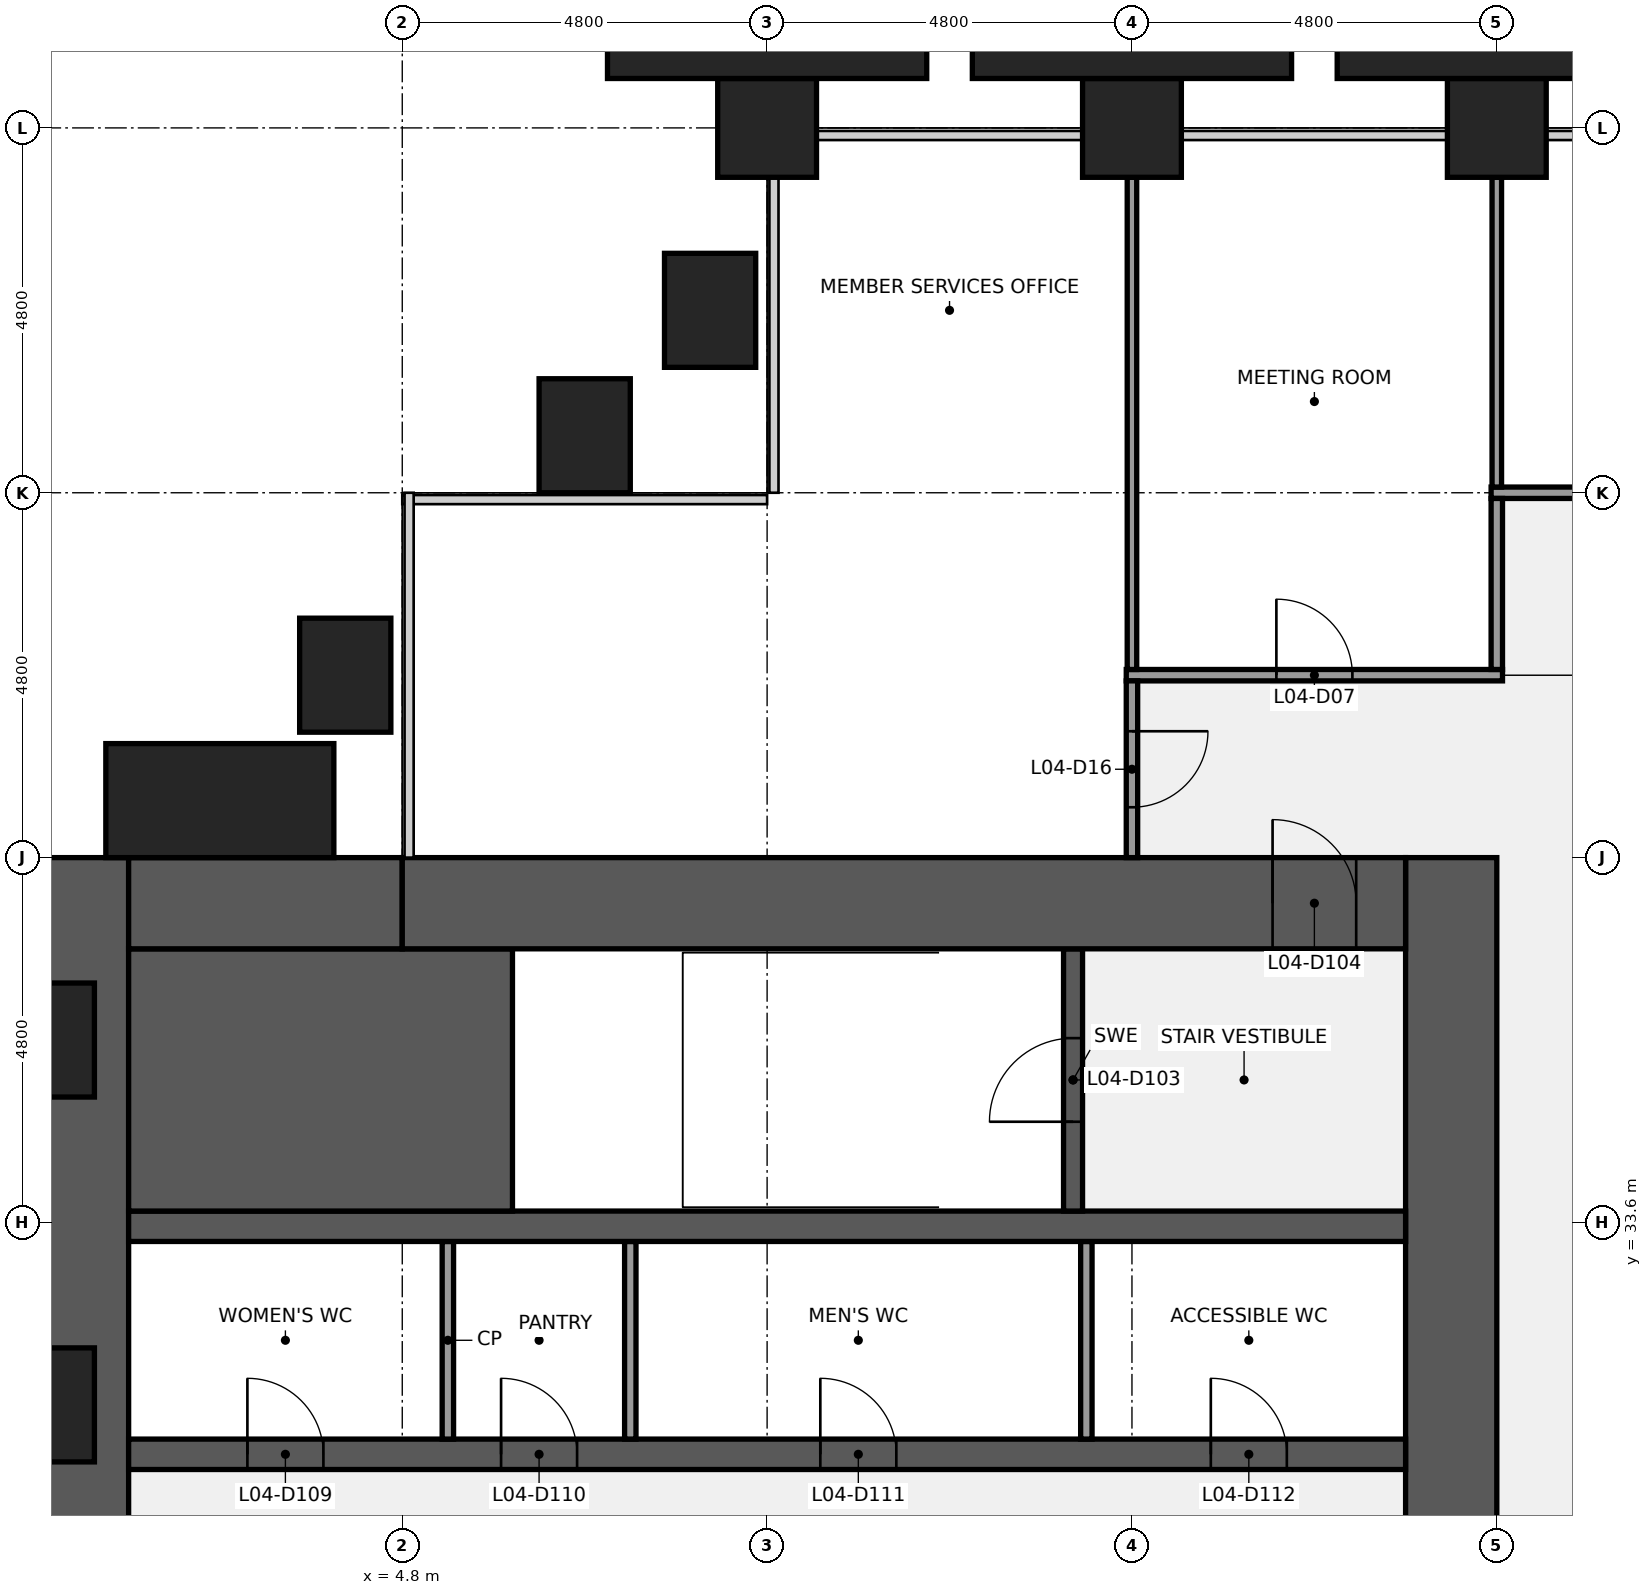
"""IFC4 building model, lengths in metres.
Left out: names, types, materials, properties, quantities, classifications, styles, units other than length and angle.
Written with IfcOpenShell. Run it as: python <this file> out.ifc"""

import sys

from ifc_helpers import new_model, si_unit, direction, frame, frame_2d, origin, origin_2d, place, context, subcontext, project, spatial, rectangle, extrude, element, fill, save


model = new_model("IFC4")
c1 = context("Model", 3, precision=1e-05, world=origin(), true_north=direction((0.0, 1.0)))
c2 = subcontext(c1, "Body", "Model", "MODEL_VIEW")
j1 = project(units=[si_unit("LENGTHUNIT", "METRE"), si_unit("PLANEANGLEUNIT", "RADIAN")], contexts=[c1])
p1 = place(None, origin())
s1 = spatial("IfcSite", under=j1, at=p1, CompositionType="ELEMENT")
p2 = place(p1, origin())
s2 = spatial("IfcBuilding", under=s1, at=p2, CompositionType="ELEMENT")
p3 = place(p2, frame((0.0, 0.0, 25.8)))
s3 = spatial("IfcBuildingStorey", under=s2, at=p3, CompositionType="ELEMENT", Elevation=25.8)
for number, where, z_axis, x_axis in (
    (1, (9.6, 48.0, 0.0), (0.0, 0.0, 1.0), (1.0, 0.0, 0.0)),
    (2, (14.4, 48.0, 0.0), (0.0, 0.0, 1.0), (1.0, 0.0, 0.0)),
    (3, (19.2, 48.0, 0.0), (0.0, 0.0, 1.0), (1.0, 0.0, 0.0)),
):
    element("IfcColumn", number, at=place(p3, frame(where, z_axis=z_axis, x_axis=x_axis)), inside=s3, PredefinedType="COLUMN", context=c2, shape_type="SweptSolid", body=[
        extrude(rectangle(XDim=1.3, YDim=1.3, at=origin_2d()), origin(), (0.0, 0.0, 1.0), 4.4),
    ])
p4 = place(p3, frame((0.6, 9.6, 0.0), z_axis=(0.0, 0.0, 1.0), x_axis=(0.0, 1.0, 0.0)))
e4 = element("IfcWall", 4, at=p4, inside=s3, PredefinedType="SHEAR", context=c2, shape_type="SweptSolid", body=[
    extrude(rectangle(XDim=28.8, YDim=1.2, at=frame_2d((14.4, 0.0))), origin(), (0.0, 0.0, 1.0), 4.24),
])
p5 = place(p4, frame((8.85, 0.0, 0.9)))
e5 = element("IfcOpeningElement", 5, at=p5, cuts=e4, PredefinedType="OPENING", context=c2, shape_type="SweptSolid", body=[
    extrude(rectangle(XDim=1.5, YDim=1.5, at=frame_2d((0.75, 0.75))), frame((0.0, 0.61, 0.0), z_axis=(0.0, -1.0, 0.0), x_axis=(1.0, 0.0, 0.0)), (0.0, 0.0, 1.0), 1.22),
])
p6 = place(p4, frame((18.45, 0.0, 0.9)))
e6 = element("IfcOpeningElement", 6, at=p6, cuts=e4, PredefinedType="OPENING", context=c2, shape_type="SweptSolid", body=[
    extrude(rectangle(XDim=1.5, YDim=1.5, at=frame_2d((0.75, 0.75))), frame((0.0, 0.61, 0.0), z_axis=(0.0, -1.0, 0.0), x_axis=(1.0, 0.0, 0.0)), (0.0, 0.0, 1.0), 1.22),
])
p7 = place(p3, frame((18.6, 38.4, 0.0), z_axis=(0.0, 0.0, 1.0), x_axis=(0.0, -1.0, 0.0)))
e7 = element("IfcWall", 7, at=p7, inside=s3, PredefinedType="SHEAR", context=c2, shape_type="SweptSolid", body=[
    extrude(rectangle(XDim=28.8, YDim=1.2, at=frame_2d((14.4, 0.0))), origin(), (0.0, 0.0, 1.0), 4.24),
])
p8 = place(p7, frame((18.3, 0.0, 0.0)))
e8 = element("IfcOpeningElement", 8, at=p8, cuts=e7, PredefinedType="OPENING", context=c2, shape_type="SweptSolid", body=[
    extrude(rectangle(XDim=1.8, YDim=2.1, at=frame_2d((0.9, 1.05))), frame((0.0, 0.61, 0.0), z_axis=(0.0, -1.0, 0.0), x_axis=(1.0, 0.0, 0.0)), (0.0, 0.0, 1.0), 1.22),
])
p9 = place(p7, frame((8.7, 0.0, 0.0)))
e9 = element("IfcOpeningElement", 9, at=p9, cuts=e7, PredefinedType="OPENING", context=c2, shape_type="SweptSolid", body=[
    extrude(rectangle(XDim=1.8, YDim=2.1, at=frame_2d((0.9, 1.05))), frame((0.0, 0.61, 0.0), z_axis=(0.0, -1.0, 0.0), x_axis=(1.0, 0.0, 0.0)), (0.0, 0.0, 1.0), 1.22),
])
p10 = place(p3, frame((1.2, 30.55, 0.0), z_axis=(0.0, 0.0, 1.0), x_axis=(1.0, 0.0, 0.0)))
e10 = element("IfcWall", 10, at=p10, inside=s3, PredefinedType="SHEAR", context=c2, shape_type="SweptSolid", body=[
    extrude(rectangle(XDim=16.8, YDim=0.4, at=frame_2d((8.4, 0.0))), origin(), (0.0, 0.0, 1.0), 4.24),
])
p11 = place(p10, frame((1.562, 0.0, 0.0)))
e11 = element("IfcOpeningElement", 11, at=p11, cuts=e10, PredefinedType="OPENING", context=c2, shape_type="SweptSolid", body=[
    extrude(rectangle(XDim=1.0, YDim=2.1, at=frame_2d((0.5, 1.05))), frame((0.0, 0.21, 0.0), z_axis=(0.0, -1.0, 0.0), x_axis=(1.0, 0.0, 0.0)), (0.0, 0.0, 1.0), 0.42),
])
p12 = place(p10, frame((4.9, 0.0, 0.0)))
e12 = element("IfcOpeningElement", 12, at=p12, cuts=e10, PredefinedType="OPENING", context=c2, shape_type="SweptSolid", body=[
    extrude(rectangle(XDim=1.0, YDim=2.1, at=frame_2d((0.5, 1.05))), frame((0.0, 0.21, 0.0), z_axis=(0.0, -1.0, 0.0), x_axis=(1.0, 0.0, 0.0)), (0.0, 0.0, 1.0), 0.42),
])
p13 = place(p10, frame((9.1, 0.0, 0.0)))
e13 = element("IfcOpeningElement", 13, at=p13, cuts=e10, PredefinedType="OPENING", context=c2, shape_type="SweptSolid", body=[
    extrude(rectangle(XDim=1.0, YDim=2.1, at=frame_2d((0.5, 1.05))), frame((0.0, 0.21, 0.0), z_axis=(0.0, -1.0, 0.0), x_axis=(1.0, 0.0, 0.0)), (0.0, 0.0, 1.0), 0.42),
])
p14 = place(p10, frame((14.238, 0.0, 0.0)))
e14 = element("IfcOpeningElement", 14, at=p14, cuts=e10, PredefinedType="OPENING", context=c2, shape_type="SweptSolid", body=[
    extrude(rectangle(XDim=1.0, YDim=2.1, at=frame_2d((0.5, 1.05))), frame((0.0, 0.21, 0.0), z_axis=(0.0, -1.0, 0.0), x_axis=(1.0, 0.0, 0.0)), (0.0, 0.0, 1.0), 0.42),
])
for number, where, z_axis, x_axis in (
    (15, (5.4, 30.75, 0.0), (0.0, 0.0, 1.0), (0.0, 1.0, 0.0)),
    (16, (7.8, 30.75, 0.0), (0.0, 0.0, 1.0), (0.0, 1.0, 0.0)),
    (17, (13.8, 30.75, 0.0), (0.0, 0.0, 1.0), (0.0, 1.0, 0.0)),
):
    element("IfcWall", number, at=place(p3, frame(where, z_axis=z_axis, x_axis=x_axis)), inside=s3, PredefinedType="PARTITIONING", context=c2, shape_type="SweptSolid", body=[
        extrude(rectangle(XDim=2.6, YDim=0.15, at=frame_2d((1.3, 0.0))), origin(), (0.0, 0.0, 1.0), 4.24),
    ])
p15 = place(p3, frame((1.2, 33.55, 0.0), z_axis=(0.0, 0.0, 1.0), x_axis=(1.0, 0.0, 0.0)))
e18 = element("IfcWall", 18, at=p15, inside=s3, PredefinedType="SHEAR", context=c2, shape_type="SweptSolid", body=[
    extrude(rectangle(XDim=16.8, YDim=0.4, at=frame_2d((8.4, 0.0))), origin(), (0.0, 0.0, 1.0), 4.24),
])
p16 = place(p3, frame((1.2, 35.475, 0.0), z_axis=(0.0, 0.0, 1.0), x_axis=(1.0, 0.0, 0.0)))
e19 = element("IfcWall", 19, at=p16, inside=s3, PredefinedType="SHEAR", context=c2, shape_type="SweptSolid", body=[
    extrude(rectangle(XDim=5.05, YDim=3.45, at=frame_2d((2.525, 0.0))), origin(), (0.0, 0.0, 1.0), 4.24),
])
p17 = place(p3, frame((13.625, 33.75, 0.0), z_axis=(0.0, 0.0, 1.0), x_axis=(0.0, 1.0, 0.0)))
e20 = element("IfcWall", 20, at=p17, inside=s3, PredefinedType="SHEAR", context=c2, shape_type="SweptSolid", body=[
    extrude(rectangle(XDim=3.45, YDim=0.25, at=frame_2d((1.725, 0.0))), origin(), (0.0, 0.0, 1.0), 4.24),
])
p18 = place(p17, frame((1.175, 0.0, 0.0)))
e21 = element("IfcOpeningElement", 21, at=p18, cuts=e20, PredefinedType="OPENING", context=c2, shape_type="SweptSolid", body=[
    extrude(rectangle(XDim=1.1, YDim=2.1, at=frame_2d((0.55, 1.05))), frame((0.0, 0.135, 0.0), z_axis=(0.0, -1.0, 0.0), x_axis=(1.0, 0.0, 0.0)), (0.0, 0.0, 1.0), 0.27),
])
p19 = place(p3, frame((1.2, 37.8, 0.0), z_axis=(0.0, 0.0, 1.0), x_axis=(1.0, 0.0, 0.0)))
e22 = element("IfcWall", 22, at=p19, inside=s3, PredefinedType="SHEAR", context=c2, shape_type="SweptSolid", body=[
    extrude(rectangle(XDim=3.6, YDim=1.2, at=frame_2d((1.8, 0.0))), origin(), (0.0, 0.0, 1.0), 4.24),
])
p20 = place(p3, frame((4.8, 37.8, 0.0), z_axis=(0.0, 0.0, 1.0), x_axis=(1.0, 0.0, 0.0)))
e23 = element("IfcWall", 23, at=p20, inside=s3, PredefinedType="SHEAR", context=c2, shape_type="SweptSolid", body=[
    extrude(rectangle(XDim=13.2, YDim=1.2, at=frame_2d((6.6, 0.0))), origin(), (0.0, 0.0, 1.0), 4.24),
])
p21 = place(p20, frame((11.45, 0.0, 0.0)))
e24 = element("IfcOpeningElement", 24, at=p21, cuts=e23, PredefinedType="OPENING", context=c2, shape_type="SweptSolid", body=[
    extrude(rectangle(XDim=1.1, YDim=2.1, at=frame_2d((0.55, 1.05))), frame((0.0, 0.61, 0.0), z_axis=(0.0, -1.0, 0.0), x_axis=(1.0, 0.0, 0.0)), (0.0, 0.0, 1.0), 1.22),
])
p22 = place(p3, frame((14.325, 40.8, 0.0), z_axis=(0.0, 0.0, 1.0), x_axis=(1.0, 0.0, 0.0)))
e25 = element("IfcWall", 25, at=p22, inside=s3, PredefinedType="PARTITIONING", context=c2, shape_type="SweptSolid", body=[
    extrude(rectangle(XDim=4.95, YDim=0.15, at=frame_2d((2.475, 0.0))), origin(), (0.0, 0.0, 1.0), 3.27),
])
p23 = place(p22, frame((1.975, 0.0, 0.0)))
e26 = element("IfcOpeningElement", 26, at=p23, cuts=e25, PredefinedType="OPENING", context=c2, shape_type="SweptSolid", body=[
    extrude(rectangle(XDim=1.0, YDim=2.1, at=frame_2d((0.5, 1.05))), frame((0.0, 0.085, 0.0), z_axis=(0.0, -1.0, 0.0), x_axis=(1.0, 0.0, 0.0)), (0.0, 0.0, 1.0), 0.17),
])
p24 = place(p3, frame((19.125, 43.2, 0.0), z_axis=(0.0, 0.0, 1.0), x_axis=(1.0, 0.0, 0.0)))
e27 = element("IfcWall", 27, at=p24, inside=s3, PredefinedType="PARTITIONING", context=c2, shape_type="SweptSolid", body=[
    extrude(rectangle(XDim=19.35, YDim=0.15, at=frame_2d((9.675, 0.0))), origin(), (0.0, 0.0, 1.0), 3.27),
])
p25 = place(p24, frame((9.175, 0.0, 0.0)))
e28 = element("IfcOpeningElement", 28, at=p25, cuts=e27, PredefinedType="OPENING", context=c2, shape_type="SweptSolid", body=[
    extrude(rectangle(XDim=1.0, YDim=2.1, at=frame_2d((0.5, 1.05))), frame((0.0, 0.085, 0.0), z_axis=(0.0, -1.0, 0.0), x_axis=(1.0, 0.0, 0.0)), (0.0, 0.0, 1.0), 0.17),
])
p26 = place(p3, frame((14.4, 40.875, 0.0), z_axis=(0.0, 0.0, 1.0), x_axis=(0.0, 1.0, 0.0)))
e29 = element("IfcWall", 29, at=p26, inside=s3, PredefinedType="PARTITIONING", context=c2, shape_type="SweptSolid", body=[
    extrude(rectangle(XDim=6.475, YDim=0.125, at=frame_2d((3.238, 0.0))), origin(), (0.0, 0.0, 1.0), 3.27),
])
p27 = place(p3, frame((14.4, 38.4, 0.0), z_axis=(0.0, 0.0, 1.0), x_axis=(0.0, 1.0, 0.0)))
e30 = element("IfcWall", 30, at=p27, inside=s3, PredefinedType="PARTITIONING", context=c2, shape_type="SweptSolid", body=[
    extrude(rectangle(XDim=2.325, YDim=0.15, at=frame_2d((1.163, 0.0))), origin(), (0.0, 0.0, 1.0), 3.27),
])
p28 = place(p27, frame((0.663, 0.0, 0.0)))
e31 = element("IfcOpeningElement", 31, at=p28, cuts=e30, PredefinedType="OPENING", context=c2, shape_type="SweptSolid", body=[
    extrude(rectangle(XDim=1.0, YDim=2.1, at=frame_2d((0.5, 1.05))), frame((0.0, 0.085, 0.0), z_axis=(0.0, -1.0, 0.0), x_axis=(1.0, 0.0, 0.0)), (0.0, 0.0, 1.0), 0.17),
])
p29 = place(p3, frame((19.2, 43.275, 0.0), z_axis=(0.0, 0.0, 1.0), x_axis=(0.0, 1.0, 0.0)))
e32 = element("IfcWall", 32, at=p29, inside=s3, PredefinedType="PARTITIONING", context=c2, shape_type="SweptSolid", body=[
    extrude(rectangle(XDim=4.075, YDim=0.125, at=frame_2d((2.038, 0.0))), origin(), (0.0, 0.0, 1.0), 3.27),
])
p30 = place(p3, frame((19.2, 40.875, 0.0), z_axis=(0.0, 0.0, 1.0), x_axis=(0.0, 1.0, 0.0)))
e33 = element("IfcWall", 33, at=p30, inside=s3, PredefinedType="PARTITIONING", context=c2, shape_type="SweptSolid", body=[
    extrude(rectangle(XDim=2.25, YDim=0.15, at=frame_2d((1.125, 0.0))), origin(), (0.0, 0.0, 1.0), 3.27),
])
for number, where, z_axis, x_axis in (
    (34, (8.85, 45.6, 0.0), (0.0, 0.0, 1.0), (0.0, 1.0, 0.0)),
    (35, (7.2, 43.95, 0.0), (0.0, 0.0, 1.0), (1.0, 0.0, 0.0)),
    (36, (4.05, 40.8, 0.0), (0.0, 0.0, 1.0), (0.0, 1.0, 0.0)),
):
    element("IfcColumn", number, at=place(p3, frame(where, z_axis=z_axis, x_axis=x_axis)), inside=s3, PredefinedType="PILASTER", context=c2, shape_type="SweptSolid", body=[
        extrude(rectangle(XDim=1.2, YDim=1.5, at=origin_2d()), origin(), (0.0, 0.0, 1.0), 4.4),
    ])
p31 = place(p3, frame((2.4, 39.15, 0.0), z_axis=(0.0, 0.0, 1.0), x_axis=(1.0, 0.0, 0.0)))
e37 = element("IfcColumn", 37, at=p31, inside=s3, PredefinedType="PILASTER", context=c2, shape_type="SweptSolid", body=[
    extrude(rectangle(XDim=3.0, YDim=1.5, at=origin_2d()), origin(), (0.0, 0.0, 1.0), 4.4),
])
for number, where, z_axis, x_axis in (
    (38, (9.6, 49.075, 0.0), (0.0, 0.0, 1.0), (1.0, 0.0, 0.0)),
    (39, (14.4, 49.075, 0.0), (0.0, 0.0, 1.0), (1.0, 0.0, 0.0)),
    (40, (19.2, 49.075, 0.0), (0.0, 0.0, 1.0), (1.0, 0.0, 0.0)),
):
    element("IfcColumn", number, at=place(p3, frame(where, z_axis=z_axis, x_axis=x_axis)), inside=s3, PredefinedType="PILASTER", context=c2, shape_type="SweptSolid", body=[
        extrude(rectangle(XDim=4.2, YDim=0.85, at=origin_2d()), origin(), (0.0, 0.0, 1.0), 4.4),
    ])
p32 = place(p18, origin())
e41 = element("IfcDoor", 41, at=p32, inside=s3, OperationType="SINGLE_SWING_LEFT", PredefinedType="DOOR", context=c2, shape_type="SweptSolid", body=[
    extrude(rectangle(XDim=1.1, YDim=2.1, at=frame_2d((0.55, 1.05))), frame((0.0, 0.025, 0.0), z_axis=(0.0, -1.0, 0.0), x_axis=(1.0, 0.0, 0.0)), (0.0, 0.0, 1.0), 0.05),
])
fill(e21, e41)
p33 = place(p21, origin())
e42 = element("IfcDoor", 42, at=p33, inside=s3, OperationType="SINGLE_SWING_LEFT", PredefinedType="DOOR", context=c2, shape_type="SweptSolid", body=[
    extrude(rectangle(XDim=1.1, YDim=2.1, at=frame_2d((0.55, 1.05))), frame((0.0, 0.025, 0.0), z_axis=(0.0, -1.0, 0.0), x_axis=(1.0, 0.0, 0.0)), (0.0, 0.0, 1.0), 0.05),
])
fill(e24, e42)
p34 = place(p11, origin())
e43 = element("IfcDoor", 43, at=p34, inside=s3, OperationType="SINGLE_SWING_LEFT", PredefinedType="DOOR", context=c2, shape_type="SweptSolid", body=[
    extrude(rectangle(XDim=1.0, YDim=2.1, at=frame_2d((0.5, 1.05))), frame((0.0, 0.025, 0.0), z_axis=(0.0, -1.0, 0.0), x_axis=(1.0, 0.0, 0.0)), (0.0, 0.0, 1.0), 0.05),
])
fill(e11, e43)
p35 = place(p12, origin())
e44 = element("IfcDoor", 44, at=p35, inside=s3, OperationType="SINGLE_SWING_LEFT", PredefinedType="DOOR", context=c2, shape_type="SweptSolid", body=[
    extrude(rectangle(XDim=1.0, YDim=2.1, at=frame_2d((0.5, 1.05))), frame((0.0, 0.025, 0.0), z_axis=(0.0, -1.0, 0.0), x_axis=(1.0, 0.0, 0.0)), (0.0, 0.0, 1.0), 0.05),
])
fill(e12, e44)
p36 = place(p13, origin())
e45 = element("IfcDoor", 45, at=p36, inside=s3, OperationType="SINGLE_SWING_LEFT", PredefinedType="DOOR", context=c2, shape_type="SweptSolid", body=[
    extrude(rectangle(XDim=1.0, YDim=2.1, at=frame_2d((0.5, 1.05))), frame((0.0, 0.025, 0.0), z_axis=(0.0, -1.0, 0.0), x_axis=(1.0, 0.0, 0.0)), (0.0, 0.0, 1.0), 0.05),
])
fill(e13, e45)
p37 = place(p14, origin())
e46 = element("IfcDoor", 46, at=p37, inside=s3, OperationType="SINGLE_SWING_LEFT", PredefinedType="DOOR", context=c2, shape_type="SweptSolid", body=[
    extrude(rectangle(XDim=1.0, YDim=2.1, at=frame_2d((0.5, 1.05))), frame((0.0, 0.025, 0.0), z_axis=(0.0, -1.0, 0.0), x_axis=(1.0, 0.0, 0.0)), (0.0, 0.0, 1.0), 0.05),
])
fill(e14, e46)
p38 = place(p23, origin())
e47 = element("IfcDoor", 47, at=p38, inside=s3, OperationType="SINGLE_SWING_LEFT", PredefinedType="DOOR", context=c2, shape_type="SweptSolid", body=[
    extrude(rectangle(XDim=1.0, YDim=2.1, at=frame_2d((0.5, 1.05))), frame((0.0, 0.025, 0.0), z_axis=(0.0, -1.0, 0.0), x_axis=(1.0, 0.0, 0.0)), (0.0, 0.0, 1.0), 0.05),
])
fill(e26, e47)
p39 = place(p28, origin())
e48 = element("IfcDoor", 48, at=p39, inside=s3, OperationType="SINGLE_SWING_RIGHT", PredefinedType="DOOR", context=c2, shape_type="SweptSolid", body=[
    extrude(rectangle(XDim=1.0, YDim=2.1, at=frame_2d((0.5, 1.05))), frame((0.0, 0.025, 0.0), z_axis=(0.0, -1.0, 0.0), x_axis=(1.0, 0.0, 0.0)), (0.0, 0.0, 1.0), 0.05),
])
fill(e31, e48)
save(model, sys.argv[1])
